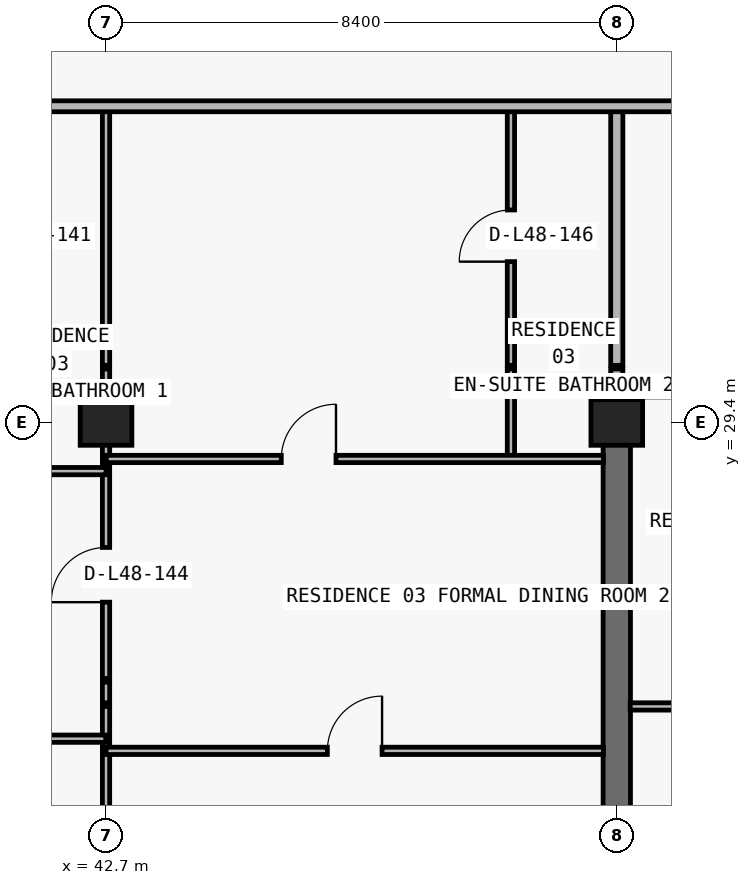
"""IFC4 building model, lengths in metres.
Left out: names, types, materials, properties, quantities, classifications, styles, units other than length and angle.
Written with IfcOpenShell. Run it as: python <this file> out.ifc"""

import sys

from ifc_helpers import new_model, si_unit, direction, frame, frame_2d, origin, origin_2d, place, context, subcontext, project, spatial, rectangle, extrude, element, fill, save


model = new_model("IFC4")
c1 = context("Model", 3, precision=1e-05, world=origin(), true_north=direction((0.0, 1.0)))
c2 = subcontext(c1, "Body", "Model", "MODEL_VIEW")
j1 = project(units=[si_unit("LENGTHUNIT", "METRE"), si_unit("PLANEANGLEUNIT", "RADIAN")], contexts=[c1])
p1 = place(None, origin())
s1 = spatial("IfcSite", under=j1, at=p1, CompositionType="ELEMENT")
p2 = place(p1, origin())
s2 = spatial("IfcBuilding", under=s1, at=p2, CompositionType="ELEMENT")
p3 = place(p2, frame((0.0, 0.0, 173.7)))
s3 = spatial("IfcBuildingStorey", under=s2, at=p3, CompositionType="ELEMENT", Elevation=173.7)
for number, where, z_axis, x_axis in (
    (1, (42.7, 29.4, 0.0), (0.0, 0.0, 1.0), (1.0, 0.0, 0.0)),
    (2, (51.1, 29.4, 0.0), (0.0, 0.0, 1.0), (1.0, 0.0, 0.0)),
):
    element("IfcColumn", number, at=place(p3, frame(where, z_axis=z_axis, x_axis=x_axis)), inside=s3, PredefinedType="COLUMN", context=c2, shape_type="SweptSolid", body=[
        extrude(rectangle(XDim=0.85, YDim=0.75, at=origin_2d()), origin(), (0.0, 0.0, 1.0), 3.05),
    ])
p4 = place(p3, frame((51.1, 20.8, 0.0), z_axis=(0.0, 0.0, 1.0), x_axis=(0.0, 1.0, 0.0)))
e3 = element("IfcWall", 3, at=p4, inside=s3, PredefinedType="SHEAR", context=c2, shape_type="SweptSolid", body=[
    extrude(rectangle(XDim=8.6, YDim=0.45, at=frame_2d((4.3, 0.0))), origin(), (0.0, 0.0, 1.0), 3.05),
])
p5 = place(p3, frame((42.7, 11.24, 0.0), z_axis=(0.0, 0.0, 1.0), x_axis=(0.0, 1.0, 0.0)))
e4 = element("IfcWall", 4, at=p5, inside=s3, PredefinedType="PARTITIONING", context=c2, shape_type="SweptSolid", body=[
    extrude(rectangle(XDim=13.49, YDim=0.12, at=frame_2d((6.745, 0.0))), origin(), (0.0, 0.0, 1.0), 2.263),
])
p6 = place(p3, frame((42.7, 24.79, 0.0), z_axis=(0.0, 0.0, 1.0), x_axis=(0.0, 1.0, 0.0)))
e5 = element("IfcWall", 5, at=p6, inside=s3, PredefinedType="PARTITIONING", context=c2, shape_type="SweptSolid", body=[
    extrude(rectangle(XDim=0.34, YDim=0.12, at=frame_2d((0.17, 0.0))), origin(), (0.0, 0.0, 1.0), 2.263),
])
p7 = place(p3, frame((42.7, 25.19, 0.0), z_axis=(0.0, 0.0, 1.0), x_axis=(0.0, 1.0, 0.0)))
e6 = element("IfcWall", 6, at=p7, inside=s3, PredefinedType="PARTITIONING", context=c2, shape_type="SweptSolid", body=[
    extrude(rectangle(XDim=4.69, YDim=0.12, at=frame_2d((2.345, 0.0))), origin(), (0.0, 0.0, 1.0), 2.263),
])
p8 = place(p7, frame((1.255, 0.0, 0.0)))
e7 = element("IfcOpeningElement", 7, at=p8, cuts=e6, PredefinedType="OPENING", context=c2, shape_type="SweptSolid", body=[
    extrude(rectangle(XDim=0.9, YDim=2.15, at=frame_2d((0.45, 1.075))), frame((0.0, 0.07, 0.0), z_axis=(0.0, -1.0, 0.0), x_axis=(1.0, 0.0, 0.0)), (0.0, 0.0, 1.0), 0.14),
])
p9 = place(p3, frame((42.7, 29.94, 0.0), z_axis=(0.0, 0.0, 1.0), x_axis=(0.0, 1.0, 0.0)))
e8 = element("IfcWall", 8, at=p9, inside=s3, PredefinedType="PARTITIONING", context=c2, shape_type="SweptSolid", body=[
    extrude(rectangle(XDim=0.34, YDim=0.12, at=frame_2d((0.17, 0.0))), origin(), (0.0, 0.0, 1.0), 2.263),
])
p10 = place(p3, frame((42.7, 30.34, 0.0), z_axis=(0.0, 0.0, 1.0), x_axis=(0.0, 1.0, 0.0)))
e9 = element("IfcWall", 9, at=p10, inside=s3, PredefinedType="PARTITIONING", context=c2, shape_type="SweptSolid", body=[
    extrude(rectangle(XDim=4.26, YDim=0.12, at=frame_2d((2.13, 0.0))), origin(), (0.0, 0.0, 1.0), 2.263),
])
p11 = place(p3, frame((49.359, 28.8, 0.0), z_axis=(0.0, 0.0, 1.0), x_axis=(0.0, 1.0, 0.0)))
e10 = element("IfcWall", 10, at=p11, inside=s3, PredefinedType="PARTITIONING", context=c2, shape_type="SweptSolid", body=[
    extrude(rectangle(XDim=1.08, YDim=0.12, at=frame_2d((0.54, 0.0))), origin(), (0.0, 0.0, 1.0), 3.05),
])
p12 = place(p3, frame((49.359, 29.94, 0.0), z_axis=(0.0, 0.0, 1.0), x_axis=(0.0, 1.0, 0.0)))
e11 = element("IfcWall", 11, at=p12, inside=s3, PredefinedType="PARTITIONING", context=c2, shape_type="SweptSolid", body=[
    extrude(rectangle(XDim=0.34, YDim=0.12, at=frame_2d((0.17, 0.0))), origin(), (0.0, 0.0, 1.0), 3.05),
])
p13 = place(p3, frame((49.359, 30.34, 0.0), z_axis=(0.0, 0.0, 1.0), x_axis=(0.0, 1.0, 0.0)))
e12 = element("IfcWall", 12, at=p13, inside=s3, PredefinedType="PARTITIONING", context=c2, shape_type="SweptSolid", body=[
    extrude(rectangle(XDim=4.26, YDim=0.12, at=frame_2d((2.13, 0.0))), origin(), (0.0, 0.0, 1.0), 3.05),
])
p14 = place(p13, frame((1.705, 0.0, 0.0)))
e13 = element("IfcOpeningElement", 13, at=p14, cuts=e12, PredefinedType="OPENING", context=c2, shape_type="SweptSolid", body=[
    extrude(rectangle(XDim=0.85, YDim=2.1, at=frame_2d((0.425, 1.05))), frame((0.0, 0.07, 0.0), z_axis=(0.0, -1.0, 0.0), x_axis=(1.0, 0.0, 0.0)), (0.0, 0.0, 1.0), 0.14),
])
p15 = place(p3, frame((51.1, 29.405, 0.0), z_axis=(0.0, 0.0, 1.0), x_axis=(0.0, 1.0, 0.0)))
e14 = element("IfcWall", 14, at=p15, inside=s3, PredefinedType="PARTITIONING", context=c2, shape_type="SweptSolid", body=[
    extrude(rectangle(XDim=0.475, YDim=0.2, at=frame_2d((0.237, 0.0))), origin(), (0.0, 0.0, 1.0), 2.335),
])
p16 = place(p3, frame((51.1, 29.94, 0.0), z_axis=(0.0, 0.0, 1.0), x_axis=(0.0, 1.0, 0.0)))
e15 = element("IfcWall", 15, at=p16, inside=s3, PredefinedType="PARTITIONING", context=c2, shape_type="SweptSolid", body=[
    extrude(rectangle(XDim=0.34, YDim=0.2, at=frame_2d((0.17, 0.0))), origin(), (0.0, 0.0, 1.0), 2.335),
])
p17 = place(p3, frame((51.1, 30.34, 0.0), z_axis=(0.0, 0.0, 1.0), x_axis=(0.0, 1.0, 0.0)))
e16 = element("IfcWall", 16, at=p17, inside=s3, PredefinedType="PARTITIONING", context=c2, shape_type="SweptSolid", body=[
    extrude(rectangle(XDim=4.26, YDim=0.2, at=frame_2d((2.13, 0.0))), origin(), (0.0, 0.0, 1.0), 2.335),
])
p18 = place(p3, frame((42.7, 24.0, 0.0), z_axis=(0.0, 0.0, 1.0), x_axis=(1.0, 0.0, 0.0)))
e17 = element("IfcWall", 17, at=p18, inside=s3, PredefinedType="PARTITIONING", context=c2, shape_type="SweptSolid", body=[
    extrude(rectangle(XDim=8.18, YDim=0.12, at=frame_2d((4.09, 0.0))), origin(), (0.0, 0.0, 1.0), 3.05),
])
p19 = place(p18, frame((3.64, 0.0, 0.0)))
e18 = element("IfcOpeningElement", 18, at=p19, cuts=e17, PredefinedType="OPENING", context=c2, shape_type="SweptSolid", body=[
    extrude(rectangle(XDim=0.9, YDim=2.15, at=frame_2d((0.45, 1.075))), frame((0.0, 0.07, 0.0), z_axis=(0.0, -1.0, 0.0), x_axis=(1.0, 0.0, 0.0)), (0.0, 0.0, 1.0), 0.14),
])
p20 = place(p3, frame((35.105, 24.2, 0.0), z_axis=(0.0, 0.0, 1.0), x_axis=(1.0, 0.0, 0.0)))
e19 = element("IfcWall", 19, at=p20, inside=s3, PredefinedType="PARTITIONING", context=c2, shape_type="SweptSolid", body=[
    extrude(rectangle(XDim=7.59, YDim=0.12, at=frame_2d((3.795, 0.0))), origin(), (0.0, 0.0, 1.0), 3.05),
])
p21 = place(p20, frame((3.345, 0.0, 0.0)))
e20 = element("IfcOpeningElement", 20, at=p21, cuts=e19, PredefinedType="OPENING", context=c2, shape_type="SweptSolid", body=[
    extrude(rectangle(XDim=0.9, YDim=2.15, at=frame_2d((0.45, 1.075))), frame((0.0, 0.07, 0.0), z_axis=(0.0, -1.0, 0.0), x_axis=(1.0, 0.0, 0.0)), (0.0, 0.0, 1.0), 0.14),
])
p22 = place(p3, frame((51.32, 24.73, 0.0), z_axis=(0.0, 0.0, 1.0), x_axis=(1.0, 0.0, 0.0)))
e21 = element("IfcWall", 21, at=p22, inside=s3, PredefinedType="PARTITIONING", context=c2, shape_type="SweptSolid", body=[
    extrude(rectangle(XDim=8.18, YDim=0.12, at=frame_2d((4.09, 0.0))), origin(), (0.0, 0.0, 1.0), 3.05),
])
p23 = place(p22, frame((1.583, 0.0, 0.0)))
e22 = element("IfcOpeningElement", 22, at=p23, cuts=e21, PredefinedType="OPENING", context=c2, shape_type="SweptSolid", body=[
    extrude(rectangle(XDim=0.9, YDim=2.15, at=frame_2d((0.45, 1.075))), frame((0.0, 0.07, 0.0), z_axis=(0.0, -1.0, 0.0), x_axis=(1.0, 0.0, 0.0)), (0.0, 0.0, 1.0), 0.14),
])
p24 = place(p22, frame((5.84, 0.0, 0.0)))
e23 = element("IfcOpeningElement", 23, at=p24, cuts=e21, PredefinedType="OPENING", context=c2, shape_type="SweptSolid", body=[
    extrude(rectangle(XDim=0.9, YDim=2.15, at=frame_2d((0.45, 1.075))), frame((0.0, 0.07, 0.0), z_axis=(0.0, -1.0, 0.0), x_axis=(1.0, 0.0, 0.0)), (0.0, 0.0, 1.0), 0.14),
])
p25 = place(p3, frame((35.1, 28.6, 0.0), z_axis=(0.0, 0.0, 1.0), x_axis=(1.0, 0.0, 0.0)))
e24 = element("IfcWall", 24, at=p25, inside=s3, PredefinedType="PARTITIONING", context=c2, shape_type="SweptSolid", body=[
    extrude(rectangle(XDim=7.6, YDim=0.12, at=frame_2d((3.8, 0.0))), origin(), (0.0, 0.0, 1.0), 3.05),
])
p26 = place(p25, frame((2.55, 0.0, 0.0)))
e25 = element("IfcOpeningElement", 25, at=p26, cuts=e24, PredefinedType="OPENING", context=c2, shape_type="SweptSolid", body=[
    extrude(rectangle(XDim=0.9, YDim=2.15, at=frame_2d((0.45, 1.075))), frame((0.0, 0.07, 0.0), z_axis=(0.0, -1.0, 0.0), x_axis=(1.0, 0.0, 0.0)), (0.0, 0.0, 1.0), 0.14),
])
p27 = place(p3, frame((42.705, 28.8, 0.0), z_axis=(0.0, 0.0, 1.0), x_axis=(1.0, 0.0, 0.0)))
e26 = element("IfcWall", 26, at=p27, inside=s3, PredefinedType="PARTITIONING", context=c2, shape_type="SweptSolid", body=[
    extrude(rectangle(XDim=8.175, YDim=0.12, at=frame_2d((4.087, 0.0))), origin(), (0.0, 0.0, 1.0), 3.05),
])
p28 = place(p27, frame((2.877, 0.0, 0.0)))
e27 = element("IfcOpeningElement", 27, at=p28, cuts=e26, PredefinedType="OPENING", context=c2, shape_type="SweptSolid", body=[
    extrude(rectangle(XDim=0.9, YDim=2.15, at=frame_2d((0.45, 1.075))), frame((0.0, 0.07, 0.0), z_axis=(0.0, -1.0, 0.0), x_axis=(1.0, 0.0, 0.0)), (0.0, 0.0, 1.0), 0.14),
])
p29 = place(p3, frame((51.1, 29.88, 0.0), z_axis=(0.0, 0.0, 1.0), x_axis=(1.0, 0.0, 0.0)))
e28 = element("IfcWall", 28, at=p29, inside=s3, PredefinedType="PARTITIONING", context=c2, shape_type="SweptSolid", body=[
    extrude(rectangle(XDim=8.4, YDim=0.12, at=frame_2d((4.2, 0.0))), origin(), (0.0, 0.0, 1.0), 3.05),
])
p30 = place(p29, frame((1.693, 0.0, 0.0)))
e29 = element("IfcOpeningElement", 29, at=p30, cuts=e28, PredefinedType="OPENING", context=c2, shape_type="SweptSolid", body=[
    extrude(rectangle(XDim=0.9, YDim=2.15, at=frame_2d((0.45, 1.075))), frame((0.0, 0.07, 0.0), z_axis=(0.0, -1.0, 0.0), x_axis=(1.0, 0.0, 0.0)), (0.0, 0.0, 1.0), 0.14),
])
p31 = place(p3, frame((18.3, 34.6, 0.0), z_axis=(0.0, 0.0, 1.0), x_axis=(1.0, 0.0, 0.0)))
e30 = element("IfcWall", 30, at=p31, inside=s3, PredefinedType="PARTITIONING", context=c2, shape_type="SweptSolid", body=[
    extrude(rectangle(XDim=41.2, YDim=0.18, at=frame_2d((20.6, 0.0))), origin(), (0.0, 0.0, 1.0), 3.05),
])
p32 = place(p31, frame((2.67, 0.0, 0.0)))
e31 = element("IfcOpeningElement", 31, at=p32, cuts=e30, PredefinedType="OPENING", context=c2, shape_type="SweptSolid", body=[
    extrude(rectangle(XDim=1.0, YDim=2.2, at=frame_2d((0.5, 1.1))), frame((0.0, 0.1, 0.0), z_axis=(0.0, -1.0, 0.0), x_axis=(1.0, 0.0, 0.0)), (0.0, 0.0, 1.0), 0.2),
])
p33 = place(p31, frame((11.212, 0.0, 0.0)))
e32 = element("IfcOpeningElement", 32, at=p33, cuts=e30, PredefinedType="OPENING", context=c2, shape_type="SweptSolid", body=[
    extrude(rectangle(XDim=1.0, YDim=2.2, at=frame_2d((0.5, 1.1))), frame((0.0, 0.1, 0.0), z_axis=(0.0, -1.0, 0.0), x_axis=(1.0, 0.0, 0.0)), (0.0, 0.0, 1.0), 0.2),
])
p34 = place(p31, frame((35.483, 0.0, 0.0)))
e33 = element("IfcOpeningElement", 33, at=p34, cuts=e30, PredefinedType="OPENING", context=c2, shape_type="SweptSolid", body=[
    extrude(rectangle(XDim=1.0, YDim=2.2, at=frame_2d((0.5, 1.1))), frame((0.0, 0.1, 0.0), z_axis=(0.0, -1.0, 0.0), x_axis=(1.0, 0.0, 0.0)), (0.0, 0.0, 1.0), 0.2),
])
p35 = place(p8, origin())
e34 = element("IfcDoor", 34, at=p35, inside=s3, OperationType="SINGLE_SWING_LEFT", PredefinedType="DOOR", context=c2, shape_type="SweptSolid", body=[
    extrude(rectangle(XDim=0.9, YDim=2.15, at=frame_2d((0.45, 1.075))), frame((0.0, 0.025, 0.0), z_axis=(0.0, -1.0, 0.0), x_axis=(1.0, 0.0, 0.0)), (0.0, 0.0, 1.0), 0.05),
])
fill(e7, e34)
p36 = place(p28, origin())
e35 = element("IfcDoor", 35, at=p36, inside=s3, OperationType="SINGLE_SWING_RIGHT", PredefinedType="DOOR", context=c2, shape_type="SweptSolid", body=[
    extrude(rectangle(XDim=0.9, YDim=2.15, at=frame_2d((0.45, 1.075))), frame((0.0, 0.025, 0.0), z_axis=(0.0, -1.0, 0.0), x_axis=(1.0, 0.0, 0.0)), (0.0, 0.0, 1.0), 0.05),
])
fill(e27, e35)
p37 = place(p14, origin())
e36 = element("IfcDoor", 36, at=p37, inside=s3, OperationType="SINGLE_SWING_LEFT", PredefinedType="DOOR", context=c2, shape_type="SweptSolid", body=[
    extrude(rectangle(XDim=0.85, YDim=2.1, at=frame_2d((0.425, 1.05))), frame((0.0, 0.025, 0.0), z_axis=(0.0, -1.0, 0.0), x_axis=(1.0, 0.0, 0.0)), (0.0, 0.0, 1.0), 0.05),
])
fill(e13, e36)
p38 = place(p19, origin())
e37 = element("IfcDoor", 37, at=p38, inside=s3, OperationType="SINGLE_SWING_RIGHT", PredefinedType="DOOR", context=c2, shape_type="SweptSolid", body=[
    extrude(rectangle(XDim=0.9, YDim=2.15, at=frame_2d((0.45, 1.075))), frame((0.0, 0.025, 0.0), z_axis=(0.0, -1.0, 0.0), x_axis=(1.0, 0.0, 0.0)), (0.0, 0.0, 1.0), 0.05),
])
fill(e18, e37)
save(model, sys.argv[1])
